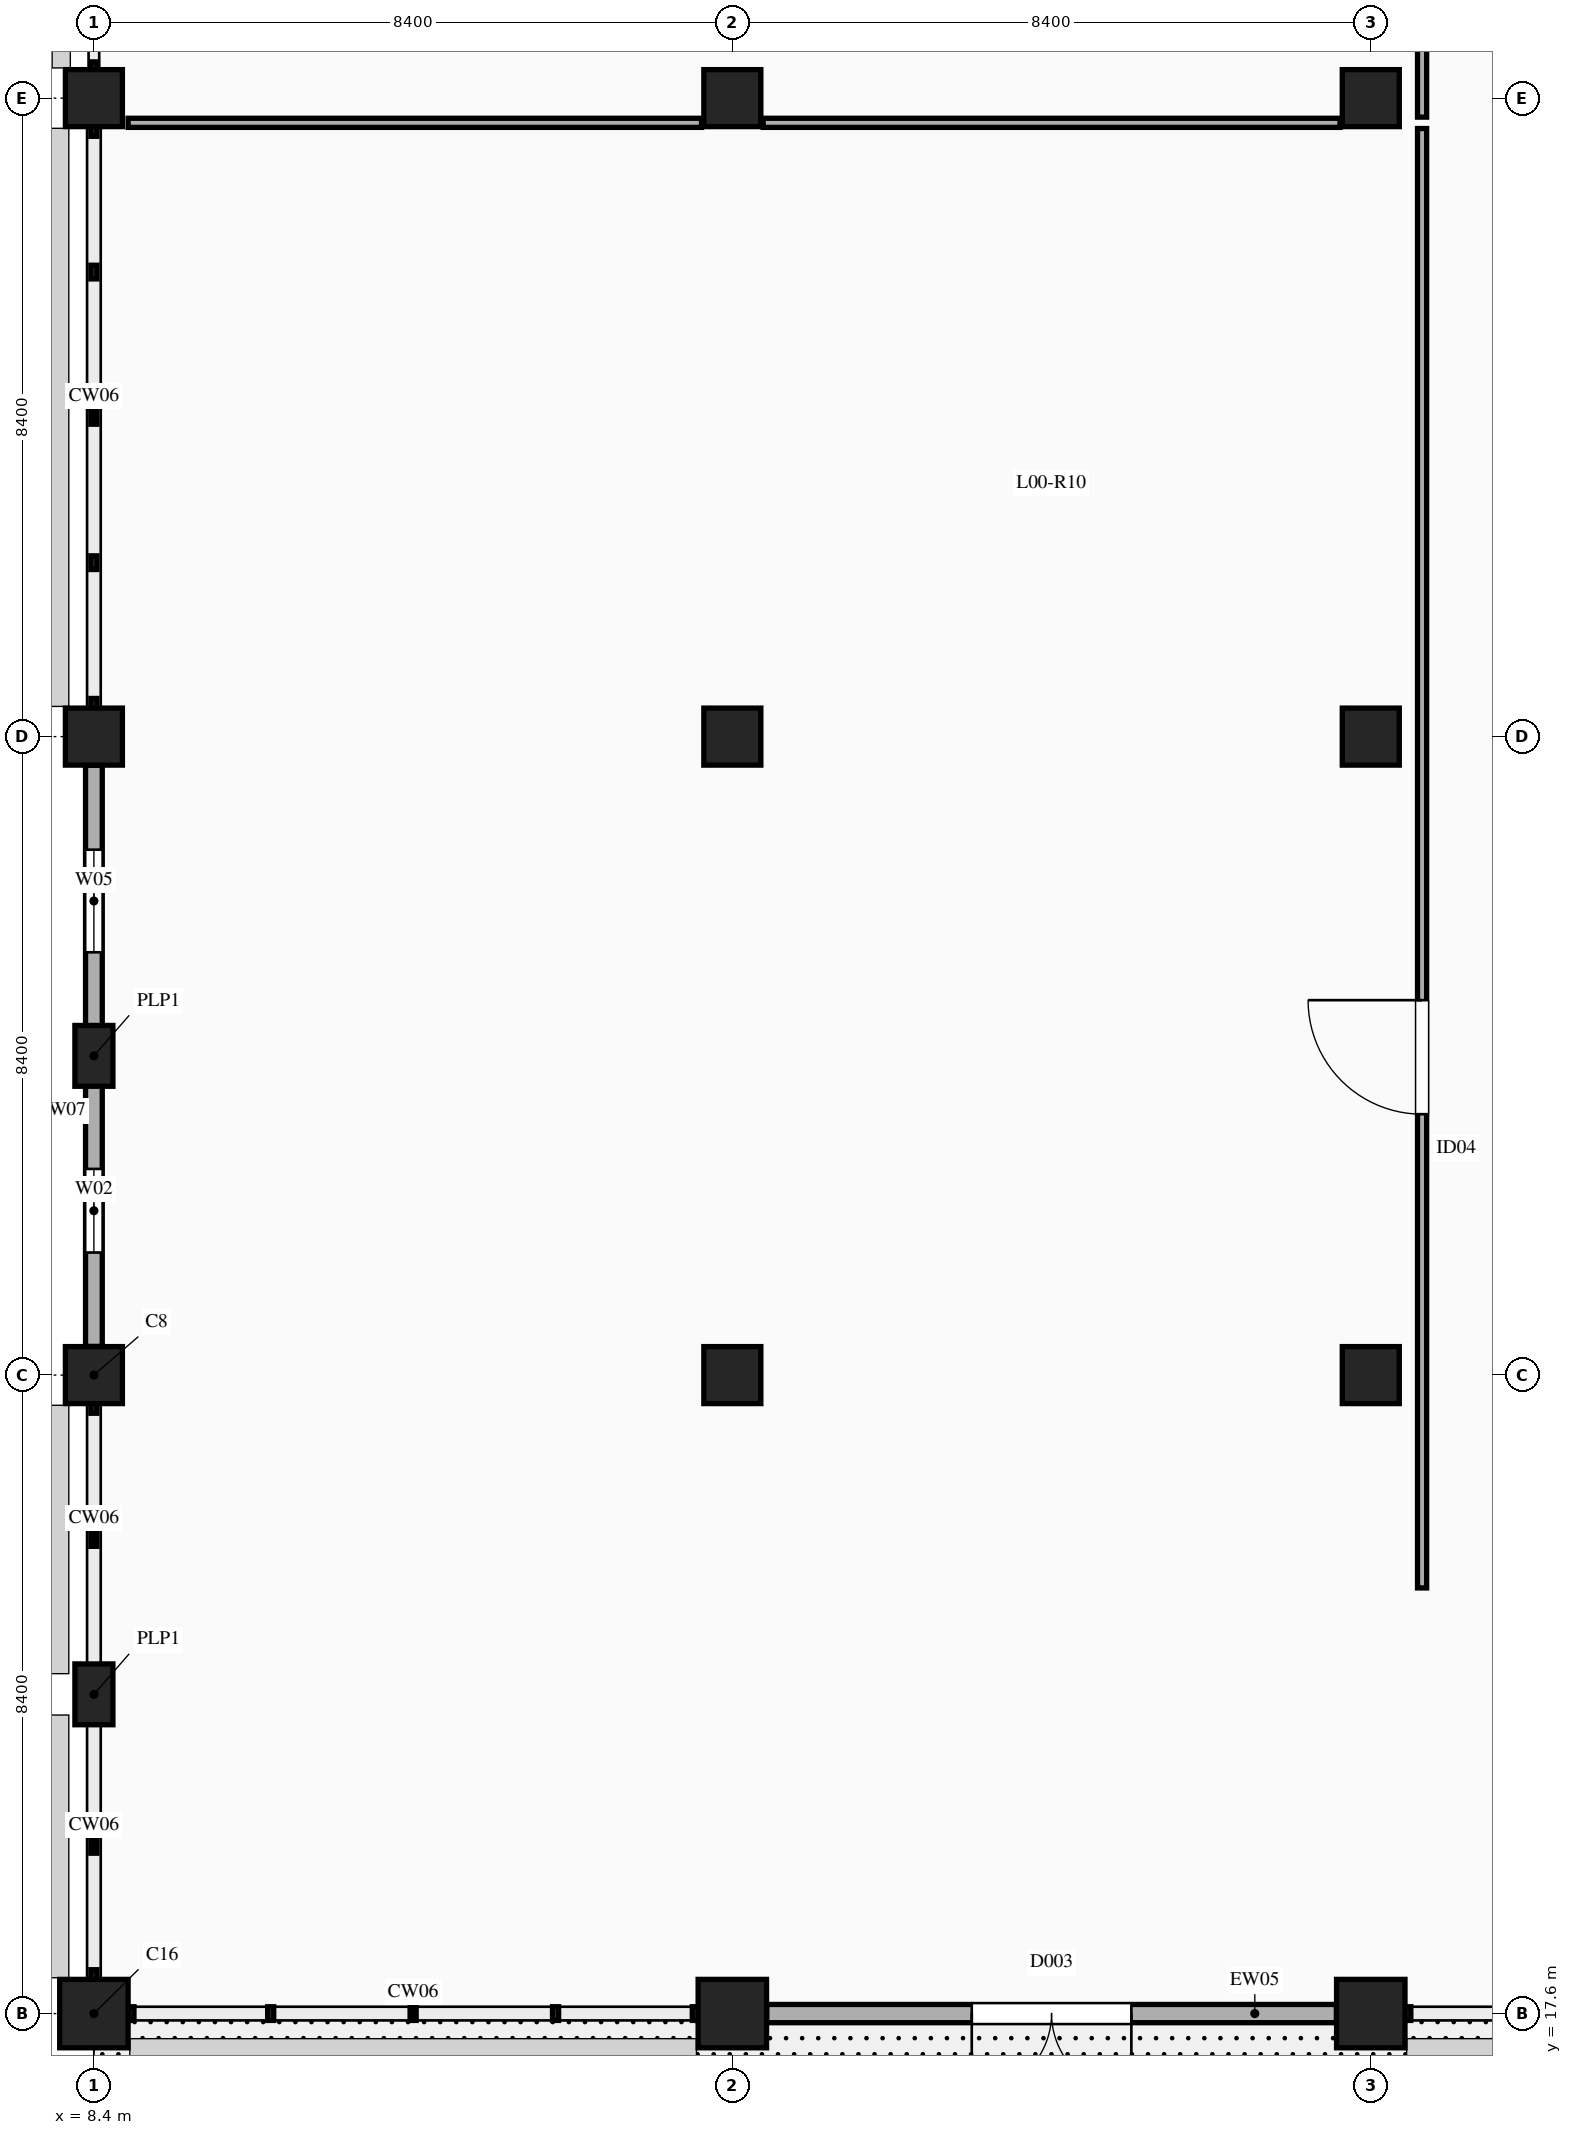
"""IFC4 building model, lengths in metres.
Left out: names, types, materials, properties, quantities, classifications, styles, units other than length and angle.
Written with IfcOpenShell. Run it as: python <this file> out.ifc"""

import sys

from ifc_helpers import new_model, si_unit, direction, frame, frame_2d, origin, origin_2d, place, context, subcontext, project, spatial, rectangle, circle, extrude, element, fill, save


model = new_model("IFC4")
c1 = context("Model", 3, precision=1e-05, world=origin(), true_north=direction((0.0, 1.0)))
c2 = subcontext(c1, "Body", "Model", "MODEL_VIEW")
j1 = project(units=[si_unit("LENGTHUNIT", "METRE"), si_unit("PLANEANGLEUNIT", "RADIAN")], contexts=[c1])
p1 = place(None, origin())
s1 = spatial("IfcSite", under=j1, at=p1, CompositionType="ELEMENT")
p2 = place(p1, origin())
s2 = spatial("IfcBuilding", under=s1, at=p2, CompositionType="ELEMENT")
p3 = place(p2, origin())
s3 = spatial("IfcBuildingStorey", under=s2, at=p3, CompositionType="ELEMENT", Elevation=0.0)
p4 = place(p3, frame((8.4, 17.6, 0.0), z_axis=(0.0, 0.0, 1.0), x_axis=(1.0, 0.0, 0.0)))
e1 = element("IfcColumn", 1, at=p4, inside=s3, PredefinedType="COLUMN", context=c2, shape_type="SweptSolid", body=[
    extrude(circle(Radius=0.45, at=origin_2d()), origin(), (0.0, 0.0, 1.0), 5.4),
])
for number, where, z_axis, x_axis in (
    (2, (8.4, 26.0, 0.0), (0.0, 0.0, 1.0), (1.0, 0.0, 0.0)),
    (3, (8.4, 34.4, 0.0), (0.0, 0.0, 1.0), (1.0, 0.0, 0.0)),
    (4, (8.4, 42.8, 0.0), (0.0, 0.0, 1.0), (1.0, 0.0, 0.0)),
):
    element("IfcColumn", number, at=place(p3, frame(where, z_axis=z_axis, x_axis=x_axis)), inside=s3, PredefinedType="COLUMN", context=c2, shape_type="SweptSolid", body=[
        extrude(rectangle(XDim=0.75, YDim=0.75, at=origin_2d()), origin(), (0.0, 0.0, 1.0), 5.4),
    ])
p5 = place(p3, frame((16.8, 17.6, 0.0), z_axis=(0.0, 0.0, 1.0), x_axis=(1.0, 0.0, 0.0)))
e5 = element("IfcColumn", 5, at=p5, inside=s3, PredefinedType="COLUMN", context=c2, shape_type="SweptSolid", body=[
    extrude(circle(Radius=0.45, at=origin_2d()), origin(), (0.0, 0.0, 1.0), 5.4),
])
for number, where, z_axis, x_axis in (
    (6, (16.8, 26.0, 0.0), (0.0, 0.0, 1.0), (1.0, 0.0, 0.0)),
    (7, (16.8, 34.4, 0.0), (0.0, 0.0, 1.0), (1.0, 0.0, 0.0)),
    (8, (16.8, 42.8, 0.0), (0.0, 0.0, 1.0), (1.0, 0.0, 0.0)),
):
    element("IfcColumn", number, at=place(p3, frame(where, z_axis=z_axis, x_axis=x_axis)), inside=s3, PredefinedType="COLUMN", context=c2, shape_type="SweptSolid", body=[
        extrude(rectangle(XDim=0.75, YDim=0.75, at=origin_2d()), origin(), (0.0, 0.0, 1.0), 5.4),
    ])
p6 = place(p3, frame((25.2, 17.6, 0.0), z_axis=(0.0, 0.0, 1.0), x_axis=(1.0, 0.0, 0.0)))
e9 = element("IfcColumn", 9, at=p6, inside=s3, PredefinedType="COLUMN", context=c2, shape_type="SweptSolid", body=[
    extrude(circle(Radius=0.45, at=origin_2d()), origin(), (0.0, 0.0, 1.0), 5.4),
])
for number, where, z_axis, x_axis in (
    (10, (25.2, 26.0, 0.0), (0.0, 0.0, 1.0), (1.0, 0.0, 0.0)),
    (11, (25.2, 34.4, 0.0), (0.0, 0.0, 1.0), (1.0, 0.0, 0.0)),
    (12, (25.2, 42.8, 0.0), (0.0, 0.0, 1.0), (1.0, 0.0, 0.0)),
):
    element("IfcColumn", number, at=place(p3, frame(where, z_axis=z_axis, x_axis=x_axis)), inside=s3, PredefinedType="COLUMN", context=c2, shape_type="SweptSolid", body=[
        extrude(rectangle(XDim=0.75, YDim=0.75, at=origin_2d()), origin(), (0.0, 0.0, 1.0), 5.4),
    ])
for number, where, z_axis, x_axis in (
    (13, (8.4, 21.8, 0.0), (0.0, 0.0, 1.0), (1.0, 0.0, 0.0)),
    (14, (8.4, 30.2, 0.0), (0.0, 0.0, 1.0), (1.0, 0.0, 0.0)),
):
    element("IfcColumn", number, at=place(p3, frame(where, z_axis=z_axis, x_axis=x_axis)), inside=s3, PredefinedType="PILASTER", context=c2, shape_type="SweptSolid", body=[
        extrude(rectangle(XDim=0.8, YDim=0.5, at=origin_2d()), origin(), (0.0, 0.0, 1.0), 5.4),
    ])
p7 = place(p3, frame((17.252, 17.6, 0.0), z_axis=(0.0, 0.0, 1.0), x_axis=(1.0, 0.0, 0.0)))
e15 = element("IfcWall", 15, at=p7, inside=s3, PredefinedType="SOLIDWALL", context=c2, shape_type="SweptSolid", body=[
    extrude(rectangle(XDim=7.496, YDim=0.24, at=frame_2d((3.748, 0.0))), origin(), (0.0, 0.0, 1.0), 4.45),
])
p8 = place(p7, frame((2.698, 0.0, 0.0)))
e16 = element("IfcOpeningElement", 16, at=p8, cuts=e15, PredefinedType="OPENING", context=c2, shape_type="SweptSolid", body=[
    extrude(rectangle(XDim=2.1, YDim=2.4, at=frame_2d((1.05, 1.2))), frame((0.0, 0.13, 0.0), z_axis=(0.0, -1.0, 0.0), x_axis=(1.0, 0.0, 0.0)), (0.0, 0.0, 1.0), 0.26),
])
p9 = place(p3, frame((8.4, 26.377, 0.0), z_axis=(0.0, 0.0, 1.0), x_axis=(0.0, 1.0, 0.0)))
e17 = element("IfcWall", 17, at=p9, inside=s3, PredefinedType="USERDEFINED", context=c2, shape_type="SweptSolid", body=[
    extrude(rectangle(XDim=3.571, YDim=0.22, at=frame_2d((1.786, 0.0))), origin(), (0.0, 0.0, 1.0), 4.45),
])
p10 = place(p9, frame((1.236, 0.0, 0.9)))
e18 = element("IfcOpeningElement", 18, at=p10, cuts=e17, PredefinedType="OPENING", context=c2, shape_type="SweptSolid", body=[
    extrude(rectangle(XDim=1.1, YDim=1.95, at=frame_2d((0.55, 0.975))), frame((0.0, 0.12, 0.0), z_axis=(0.0, -1.0, 0.0), x_axis=(1.0, 0.0, 0.0)), (0.0, 0.0, 1.0), 0.24),
])
p11 = place(p3, frame((8.4, 30.452, 0.0), z_axis=(0.0, 0.0, 1.0), x_axis=(0.0, 1.0, 0.0)))
e19 = element("IfcWall", 19, at=p11, inside=s3, PredefinedType="USERDEFINED", context=c2, shape_type="SweptSolid", body=[
    extrude(rectangle(XDim=3.571, YDim=0.22, at=frame_2d((1.786, 0.0))), origin(), (0.0, 0.0, 1.0), 4.45),
])
p12 = place(p11, frame((1.111, 0.0, 0.9)))
e20 = element("IfcOpeningElement", 20, at=p12, cuts=e19, PredefinedType="OPENING", context=c2, shape_type="SweptSolid", body=[
    extrude(rectangle(XDim=1.35, YDim=1.85, at=frame_2d((0.675, 0.925))), frame((0.0, 0.12, 0.0), z_axis=(0.0, -1.0, 0.0), x_axis=(1.0, 0.0, 0.0)), (0.0, 0.0, 1.0), 0.24),
])
p13 = place(p3, frame((25.875, 23.2, 0.0), z_axis=(0.0, 0.0, 1.0), x_axis=(0.0, 1.0, 0.0)))
e21 = element("IfcWall", 21, at=p13, inside=s3, PredefinedType="PARTITIONING", context=c2, shape_type="SweptSolid", body=[
    extrude(rectangle(XDim=19.2, YDim=0.12, at=frame_2d((9.6, 0.0))), origin(), (0.0, 0.0, 1.0), 4.35),
])
p14 = place(p13, frame((6.233, 0.0, 0.0)))
e22 = element("IfcOpeningElement", 22, at=p14, cuts=e21, PredefinedType="OPENING", context=c2, shape_type="SweptSolid", body=[
    extrude(rectangle(XDim=1.5, YDim=2.3, at=frame_2d((0.75, 1.15))), frame((0.0, 0.07, 0.0), z_axis=(0.0, -1.0, 0.0), x_axis=(1.0, 0.0, 0.0)), (0.0, 0.0, 1.0), 0.14),
])
p15 = place(p3, frame((25.875, 42.55, 0.0), z_axis=(0.0, 0.0, 1.0), x_axis=(0.0, 1.0, 0.0)))
e23 = element("IfcWall", 23, at=p15, inside=s3, PredefinedType="PARTITIONING", context=c2, shape_type="SweptSolid", body=[
    extrude(rectangle(XDim=19.65, YDim=0.12, at=frame_2d((9.825, 0.0))), origin(), (0.0, 0.0, 1.0), 4.35),
])
p16 = place(p15, frame((10.45, 0.0, 0.0)))
e24 = element("IfcOpeningElement", 24, at=p16, cuts=e23, PredefinedType="OPENING", context=c2, shape_type="SweptSolid", body=[
    extrude(rectangle(XDim=1.6, YDim=2.35, at=frame_2d((0.8, 1.175))), frame((0.0, 0.07, 0.0), z_axis=(0.0, -1.0, 0.0), x_axis=(1.0, 0.0, 0.0)), (0.0, 0.0, 1.0), 0.14),
])
p17 = place(p3, frame((8.85, 42.475, 0.0), z_axis=(0.0, 0.0, 1.0), x_axis=(1.0, 0.0, 0.0)))
e25 = element("IfcWall", 25, at=p17, inside=s3, PredefinedType="PARTITIONING", context=c2, shape_type="SweptSolid", body=[
    extrude(rectangle(XDim=7.545, YDim=0.12, at=frame_2d((3.772, 0.0))), origin(), (0.0, 0.0, 1.0), 4.35),
])
p18 = place(p3, frame((17.205, 42.475, 0.0), z_axis=(0.0, 0.0, 1.0), x_axis=(1.0, 0.0, 0.0)))
e26 = element("IfcWall", 26, at=p18, inside=s3, PredefinedType="PARTITIONING", context=c2, shape_type="SweptSolid", body=[
    extrude(rectangle(XDim=7.59, YDim=0.12, at=frame_2d((3.795, 0.0))), origin(), (0.0, 0.0, 1.0), 4.35),
])
p19 = place(p8, frame((2.1, 0.0, 0.0), z_axis=(0.0, 0.0, 1.0), x_axis=(-1.0, 0.0, 0.0)))
e27 = element("IfcDoor", 27, at=p19, inside=s3, OperationType="DOUBLE_DOOR_SINGLE_SWING", PredefinedType="DOOR", context=c2, shape_type="SweptSolid", body=[
    extrude(rectangle(XDim=2.1, YDim=2.4, at=frame_2d((1.05, 1.2))), frame((0.0, 0.025, 0.0), z_axis=(0.0, -1.0, 0.0), x_axis=(1.0, 0.0, 0.0)), (0.0, 0.0, 1.0), 0.05),
])
fill(e16, e27)
p20 = place(p10, origin())
e28 = element("IfcWindow", 28, at=p20, inside=s3, PartitioningType="SINGLE_PANEL", PredefinedType="WINDOW", context=c2, shape_type="SweptSolid", body=[
    extrude(rectangle(XDim=1.1, YDim=1.95, at=frame_2d((0.55, 0.975))), frame((0.0, 0.03, 0.0), z_axis=(0.0, -1.0, 0.0), x_axis=(1.0, 0.0, 0.0)), (0.0, 0.0, 1.0), 0.06),
])
fill(e18, e28)
p21 = place(p12, origin())
e29 = element("IfcWindow", 29, at=p21, inside=s3, PartitioningType="DOUBLE_PANEL_VERTICAL", PredefinedType="WINDOW", context=c2, shape_type="SweptSolid", body=[
    extrude(rectangle(XDim=1.35, YDim=1.85, at=frame_2d((0.675, 0.925))), frame((0.0, 0.03, 0.0), z_axis=(0.0, -1.0, 0.0), x_axis=(1.0, 0.0, 0.0)), (0.0, 0.0, 1.0), 0.06),
])
fill(e20, e29)
p22 = place(p14, origin())
e30 = element("IfcDoor", 30, at=p22, inside=s3, OperationType="SINGLE_SWING_RIGHT", PredefinedType="DOOR", context=c2, shape_type="SweptSolid", body=[
    extrude(rectangle(XDim=1.5, YDim=2.3, at=frame_2d((0.75, 1.15))), frame((0.0, 0.025, 0.0), z_axis=(0.0, -1.0, 0.0), x_axis=(1.0, 0.0, 0.0)), (0.0, 0.0, 1.0), 0.05),
])
fill(e22, e30)
save(model, sys.argv[1])
